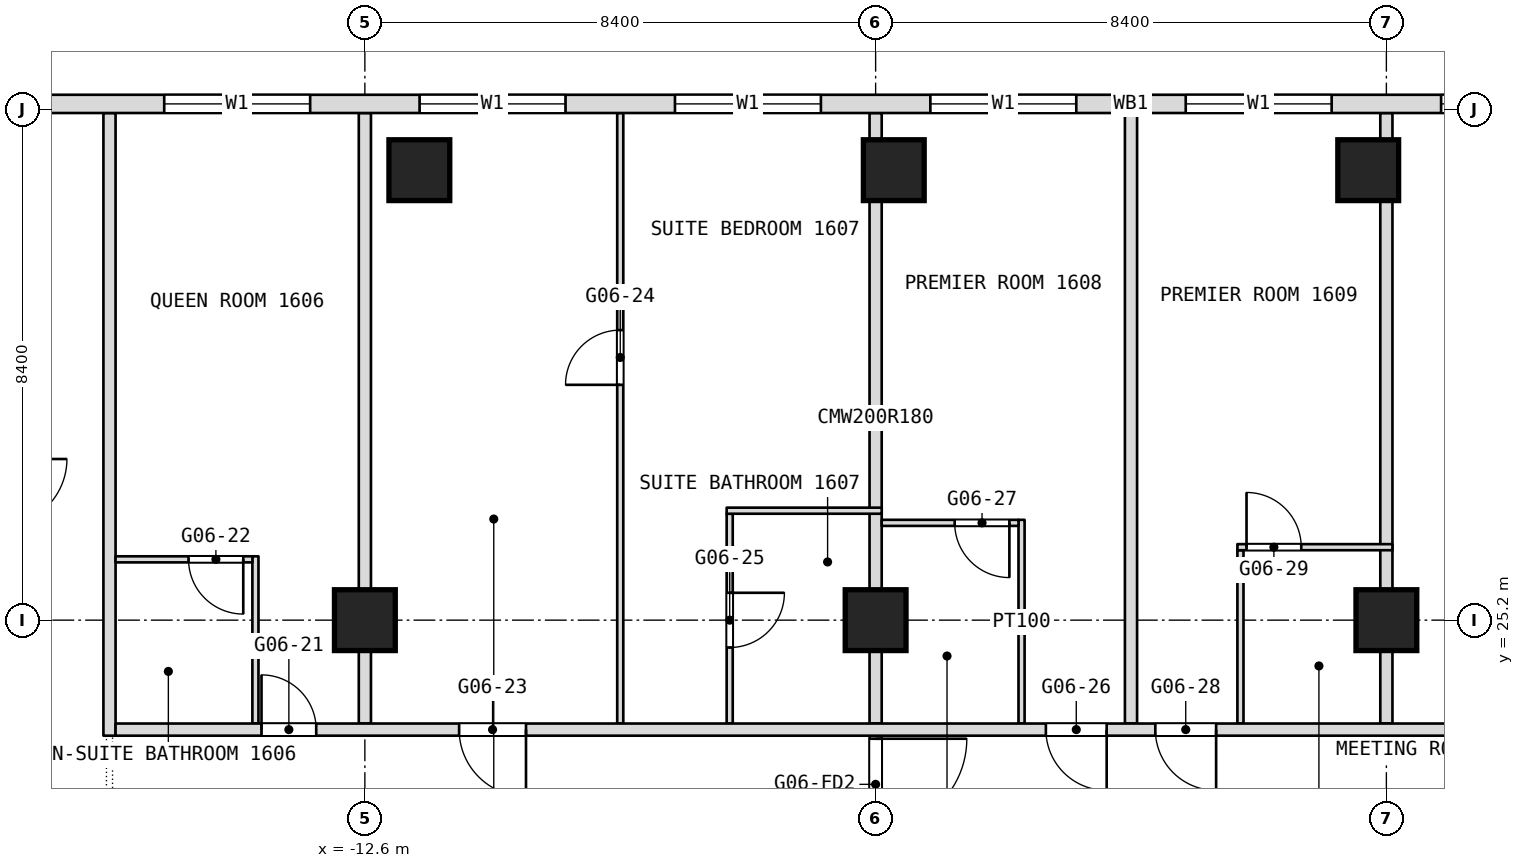
"""IFC4 building model, lengths in metres.
Left out: names, types, materials, properties, quantities, classifications, styles, units other than length and angle.
Written with IfcOpenShell. Run it as: python <this file> out.ifc"""

import sys

from ifc_helpers import new_model, si_unit, direction, frame, frame_2d, origin, origin_2d, place, context, subcontext, project, spatial, rectangle, extrude, element, fill, save


model = new_model("IFC4")
c1 = context("Model", 3, precision=1e-05, world=origin(), true_north=direction((0.0, 1.0)))
c2 = subcontext(c1, "Body", "Model", "MODEL_VIEW")
j1 = project(units=[si_unit("LENGTHUNIT", "METRE"), si_unit("PLANEANGLEUNIT", "RADIAN")], contexts=[c1])
p1 = place(None, origin())
s1 = spatial("IfcSite", under=j1, at=p1, CompositionType="ELEMENT")
p2 = place(p1, origin())
s2 = spatial("IfcBuilding", under=s1, at=p2, CompositionType="ELEMENT")
p3 = place(p2, frame((0.0, 0.0, 72.5)))
s3 = spatial("IfcBuildingStorey", under=s2, at=p3, CompositionType="ELEMENT", Elevation=72.5)
for number, where, z_axis, x_axis in (
    (1, (-12.6, 25.2, 0.0), (0.0, 0.0, 1.0), (1.0, 0.0, 0.0)),
    (2, (-4.2, 25.2, 0.0), (0.0, 0.0, 1.0), (1.0, 0.0, 0.0)),
    (3, (4.2, 25.2, 0.0), (0.0, 0.0, 1.0), (1.0, 0.0, 0.0)),
    (4, (-11.704, 32.6, 0.0), (0.0, 0.0, 1.0), (1.0, 0.0, 0.0)),
    (5, (-3.901, 32.6, 0.0), (0.0, 0.0, 1.0), (1.0, 0.0, 0.0)),
    (6, (3.901, 32.6, 0.0), (0.0, 0.0, 1.0), (1.0, 0.0, 0.0)),
):
    element("IfcColumn", number, at=place(p3, frame(where, z_axis=z_axis, x_axis=x_axis)), inside=s3, PredefinedType="COLUMN", context=c2, shape_type="SweptSolid", body=[
        extrude(rectangle(XDim=1.0, YDim=1.0, at=origin_2d()), origin(), (0.0, 0.0, 1.0), 3.6),
    ])
p4 = place(p3, frame((4.2, 23.5, 0.0), z_axis=(0.0, 0.0, 1.0), x_axis=(0.0, 1.0, 0.0)))
e7 = element("IfcWall", 7, at=p4, inside=s3, PredefinedType="PARTITIONING", context=c2, shape_type="SweptSolid", body=[
    extrude(rectangle(XDim=10.04, YDim=0.2, at=frame_2d((5.02, 0.0))), origin(), (0.0, 0.0, 1.0), 3.34),
])
p5 = place(p3, frame((1.8, 23.5, 0.0), z_axis=(0.0, 0.0, 1.0), x_axis=(0.0, 1.0, 0.0)))
e8 = element("IfcWall", 8, at=p5, inside=s3, PredefinedType="PARTITIONING", context=c2, shape_type="SweptSolid", body=[
    extrude(rectangle(XDim=2.85, YDim=0.1, at=frame_2d((1.425, 0.0))), origin(), (0.0, 0.0, 1.0), 3.34),
])
p6 = place(p3, frame((0.0, 23.5, 0.0), z_axis=(0.0, 0.0, 1.0), x_axis=(0.0, 1.0, 0.0)))
e9 = element("IfcWall", 9, at=p6, inside=s3, PredefinedType="PARTITIONING", context=c2, shape_type="SweptSolid", body=[
    extrude(rectangle(XDim=10.04, YDim=0.2, at=frame_2d((5.02, 0.0))), origin(), (0.0, 0.0, 1.0), 3.34),
])
p7 = place(p3, frame((-1.8, 23.5, 0.0), z_axis=(0.0, 0.0, 1.0), x_axis=(0.0, 1.0, 0.0)))
e10 = element("IfcWall", 10, at=p7, inside=s3, PredefinedType="PARTITIONING", context=c2, shape_type="SweptSolid", body=[
    extrude(rectangle(XDim=3.35, YDim=0.1, at=frame_2d((1.675, 0.0))), origin(), (0.0, 0.0, 1.0), 3.34),
])
p8 = place(p3, frame((-4.2, 16.8, 0.0), z_axis=(0.0, 0.0, 1.0), x_axis=(0.0, 1.0, 0.0)))
e11 = element("IfcWall", 11, at=p8, inside=s3, PredefinedType="PARTITIONING", context=c2, shape_type="SweptSolid", body=[
    extrude(rectangle(XDim=6.7, YDim=0.2, at=frame_2d((3.35, 0.0))), origin(), (0.0, 0.0, 1.0), 3.34),
])
p9 = place(p8, frame((0.15, 0.0, 0.0)))
e12 = element("IfcOpeningElement", 12, at=p9, cuts=e11, PredefinedType="OPENING", context=c2, shape_type="SweptSolid", body=[
    extrude(rectangle(XDim=1.5, YDim=2.1, at=frame_2d((0.75, 1.05))), frame((0.0, 0.1, 0.0), z_axis=(0.0, -1.0, 0.0), x_axis=(1.0, 0.0, 0.0)), (0.0, 0.0, 1.0), 0.2),
])
p10 = place(p8, frame((4.95, 0.0, 0.0)))
e13 = element("IfcOpeningElement", 13, at=p10, cuts=e11, PredefinedType="OPENING", context=c2, shape_type="SweptSolid", body=[
    extrude(rectangle(XDim=1.5, YDim=2.1, at=frame_2d((0.75, 1.05))), frame((0.0, 0.1, 0.0), z_axis=(0.0, -1.0, 0.0), x_axis=(1.0, 0.0, 0.0)), (0.0, 0.0, 1.0), 0.2),
])
p11 = place(p3, frame((-4.2, 23.5, 0.0), z_axis=(0.0, 0.0, 1.0), x_axis=(0.0, 1.0, 0.0)))
e14 = element("IfcWall", 14, at=p11, inside=s3, PredefinedType="PARTITIONING", context=c2, shape_type="SweptSolid", body=[
    extrude(rectangle(XDim=10.04, YDim=0.2, at=frame_2d((5.02, 0.0))), origin(), (0.0, 0.0, 1.0), 3.34),
])
p12 = place(p3, frame((-6.6, 23.5, 0.0), z_axis=(0.0, 0.0, 1.0), x_axis=(0.0, 1.0, 0.0)))
e15 = element("IfcWall", 15, at=p12, inside=s3, PredefinedType="PARTITIONING", context=c2, shape_type="SweptSolid", body=[
    extrude(rectangle(XDim=3.45, YDim=0.1, at=frame_2d((1.725, 0.0))), origin(), (0.0, 0.0, 1.0), 3.34),
])
p13 = place(p12, frame((1.25, 0.0, 0.0)))
e16 = element("IfcOpeningElement", 16, at=p13, cuts=e15, PredefinedType="OPENING", context=c2, shape_type="SweptSolid", body=[
    extrude(rectangle(XDim=0.9, YDim=2.1, at=frame_2d((0.45, 1.05))), frame((0.0, 0.05, 0.0), z_axis=(0.0, -1.0, 0.0), x_axis=(1.0, 0.0, 0.0)), (0.0, 0.0, 1.0), 0.1),
])
p14 = place(p3, frame((-8.4, 23.5, 0.0), z_axis=(0.0, 0.0, 1.0), x_axis=(0.0, 1.0, 0.0)))
e17 = element("IfcWall", 17, at=p14, inside=s3, PredefinedType="PARTITIONING", context=c2, shape_type="SweptSolid", body=[
    extrude(rectangle(XDim=10.04, YDim=0.1, at=frame_2d((5.02, 0.0))), origin(), (0.0, 0.0, 1.0), 3.34),
])
p15 = place(p14, frame((5.57, 0.0, 0.0)))
e18 = element("IfcOpeningElement", 18, at=p15, cuts=e17, PredefinedType="OPENING", context=c2, shape_type="SweptSolid", body=[
    extrude(rectangle(XDim=0.9, YDim=2.1, at=frame_2d((0.45, 1.05))), frame((0.0, 0.05, 0.0), z_axis=(0.0, -1.0, 0.0), x_axis=(1.0, 0.0, 0.0)), (0.0, 0.0, 1.0), 0.1),
])
p16 = place(p3, frame((-12.6, 23.5, 0.0), z_axis=(0.0, 0.0, 1.0), x_axis=(0.0, 1.0, 0.0)))
e19 = element("IfcWall", 19, at=p16, inside=s3, PredefinedType="PARTITIONING", context=c2, shape_type="SweptSolid", body=[
    extrude(rectangle(XDim=10.04, YDim=0.2, at=frame_2d((5.02, 0.0))), origin(), (0.0, 0.0, 1.0), 3.34),
])
p17 = place(p3, frame((-14.4, 23.5, 0.0), z_axis=(0.0, 0.0, 1.0), x_axis=(0.0, 1.0, 0.0)))
e20 = element("IfcWall", 20, at=p17, inside=s3, PredefinedType="PARTITIONING", context=c2, shape_type="SweptSolid", body=[
    extrude(rectangle(XDim=2.75, YDim=0.1, at=frame_2d((1.375, 0.0))), origin(), (0.0, 0.0, 1.0), 3.34),
])
p18 = place(p3, frame((-16.8, 23.3, 0.0), z_axis=(0.0, 0.0, 1.0), x_axis=(0.0, 1.0, 0.0)))
e21 = element("IfcWall", 21, at=p18, inside=s3, PredefinedType="PARTITIONING", context=c2, shape_type="SweptSolid", body=[
    extrude(rectangle(XDim=10.24, YDim=0.2, at=frame_2d((5.12, 0.0))), origin(), (0.0, 0.0, 1.0), 3.34),
])
p19 = place(p3, frame((-16.7, 23.4, 0.0), z_axis=(0.0, 0.0, 1.0), x_axis=(1.0, 0.0, 0.0)))
e22 = element("IfcWall", 22, at=p19, inside=s3, PredefinedType="PARTITIONING", context=c2, shape_type="SweptSolid", body=[
    extrude(rectangle(XDim=23.4, YDim=0.2, at=frame_2d((11.7, 0.0))), origin(), (0.0, 0.0, 1.0), 3.34),
])
p20 = place(p19, frame((2.4, 0.0, 0.0)))
e23 = element("IfcOpeningElement", 23, at=p20, cuts=e22, PredefinedType="OPENING", context=c2, shape_type="SweptSolid", body=[
    extrude(rectangle(XDim=0.9, YDim=2.1, at=frame_2d((0.45, 1.05))), frame((0.0, 0.1, 0.0), z_axis=(0.0, -1.0, 0.0), x_axis=(1.0, 0.0, 0.0)), (0.0, 0.0, 1.0), 0.2),
])
p21 = place(p19, frame((5.65, 0.0, 0.0)))
e24 = element("IfcOpeningElement", 24, at=p21, cuts=e22, PredefinedType="OPENING", context=c2, shape_type="SweptSolid", body=[
    extrude(rectangle(XDim=1.1, YDim=2.1, at=frame_2d((0.55, 1.05))), frame((0.0, 0.1, 0.0), z_axis=(0.0, -1.0, 0.0), x_axis=(1.0, 0.0, 0.0)), (0.0, 0.0, 1.0), 0.2),
])
p22 = place(p19, frame((15.3, 0.0, 0.0)))
e25 = element("IfcOpeningElement", 25, at=p22, cuts=e22, PredefinedType="OPENING", context=c2, shape_type="SweptSolid", body=[
    extrude(rectangle(XDim=1.0, YDim=2.1, at=frame_2d((0.5, 1.05))), frame((0.0, 0.1, 0.0), z_axis=(0.0, -1.0, 0.0), x_axis=(1.0, 0.0, 0.0)), (0.0, 0.0, 1.0), 0.2),
])
p23 = place(p19, frame((17.1, 0.0, 0.0)))
e26 = element("IfcOpeningElement", 26, at=p23, cuts=e22, PredefinedType="OPENING", context=c2, shape_type="SweptSolid", body=[
    extrude(rectangle(XDim=1.0, YDim=2.1, at=frame_2d((0.5, 1.05))), frame((0.0, 0.1, 0.0), z_axis=(0.0, -1.0, 0.0), x_axis=(1.0, 0.0, 0.0)), (0.0, 0.0, 1.0), 0.2),
])
p24 = place(p3, frame((-16.7, 26.2, 0.0), z_axis=(0.0, 0.0, 1.0), x_axis=(1.0, 0.0, 0.0)))
e27 = element("IfcWall", 27, at=p24, inside=s3, PredefinedType="PARTITIONING", context=c2, shape_type="SweptSolid", body=[
    extrude(rectangle(XDim=2.25, YDim=0.1, at=frame_2d((1.125, 0.0))), origin(), (0.0, 0.0, 1.0), 3.34),
])
p25 = place(p24, frame((1.2, 0.0, 0.0)))
e28 = element("IfcOpeningElement", 28, at=p25, cuts=e27, PredefinedType="OPENING", context=c2, shape_type="SweptSolid", body=[
    extrude(rectangle(XDim=0.9, YDim=2.1, at=frame_2d((0.45, 1.05))), frame((0.0, 0.05, 0.0), z_axis=(0.0, -1.0, 0.0), x_axis=(1.0, 0.0, 0.0)), (0.0, 0.0, 1.0), 0.1),
])
p26 = place(p3, frame((1.75, 26.4, 0.0), z_axis=(0.0, 0.0, 1.0), x_axis=(1.0, 0.0, 0.0)))
e29 = element("IfcWall", 29, at=p26, inside=s3, PredefinedType="PARTITIONING", context=c2, shape_type="SweptSolid", body=[
    extrude(rectangle(XDim=2.55, YDim=0.1, at=frame_2d((1.275, 0.0))), origin(), (0.0, 0.0, 1.0), 3.34),
])
p27 = place(p26, frame((0.15, 0.0, 0.0)))
e30 = element("IfcOpeningElement", 30, at=p27, cuts=e29, PredefinedType="OPENING", context=c2, shape_type="SweptSolid", body=[
    extrude(rectangle(XDim=0.9, YDim=2.1, at=frame_2d((0.45, 1.05))), frame((0.0, 0.05, 0.0), z_axis=(0.0, -1.0, 0.0), x_axis=(1.0, 0.0, 0.0)), (0.0, 0.0, 1.0), 0.1),
])
p28 = place(p3, frame((-4.1, 26.8, 0.0), z_axis=(0.0, 0.0, 1.0), x_axis=(1.0, 0.0, 0.0)))
e31 = element("IfcWall", 31, at=p28, inside=s3, PredefinedType="PARTITIONING", context=c2, shape_type="SweptSolid", body=[
    extrude(rectangle(XDim=2.25, YDim=0.1, at=frame_2d((1.125, 0.0))), origin(), (0.0, 0.0, 1.0), 3.34),
])
p29 = place(p28, frame((1.2, 0.0, 0.0)))
e32 = element("IfcOpeningElement", 32, at=p29, cuts=e31, PredefinedType="OPENING", context=c2, shape_type="SweptSolid", body=[
    extrude(rectangle(XDim=0.9, YDim=2.1, at=frame_2d((0.45, 1.05))), frame((0.0, 0.05, 0.0), z_axis=(0.0, -1.0, 0.0), x_axis=(1.0, 0.0, 0.0)), (0.0, 0.0, 1.0), 0.1),
])
p30 = place(p3, frame((-6.65, 27.0, 0.0), z_axis=(0.0, 0.0, 1.0), x_axis=(1.0, 0.0, 0.0)))
e33 = element("IfcWall", 33, at=p30, inside=s3, PredefinedType="PARTITIONING", context=c2, shape_type="SweptSolid", body=[
    extrude(rectangle(XDim=2.55, YDim=0.1, at=frame_2d((1.275, 0.0))), origin(), (0.0, 0.0, 1.0), 3.34),
])
p31 = place(p3, frame((23.406, 33.69, 0.0), z_axis=(0.0, 0.0, 1.0), x_axis=(-1.0, 0.0, 0.0)))
e34 = element("IfcWall", 34, at=p31, inside=s3, PredefinedType="NOTDEFINED", context=c2, shape_type="SweptSolid", body=[
    extrude(rectangle(XDim=46.812, YDim=0.3, at=frame_2d((23.406, 0.0))), origin(), (0.0, 0.0, 1.0), 3.6),
])
p32 = place(p31, frame((2.186, 0.0, 0.9)))
e35 = element("IfcOpeningElement", 35, at=p32, cuts=e34, PredefinedType="OPENING", context=c2, shape_type="SweptSolid", body=[
    extrude(rectangle(XDim=2.4, YDim=2.1, at=frame_2d((1.2, 1.05))), frame((0.0, 0.15, 0.0), z_axis=(0.0, -1.0, 0.0), x_axis=(1.0, 0.0, 0.0)), (0.0, 0.0, 1.0), 0.3),
])
p33 = place(p31, frame((7.506, 0.0, 0.9)))
e36 = element("IfcOpeningElement", 36, at=p33, cuts=e34, PredefinedType="OPENING", context=c2, shape_type="SweptSolid", body=[
    extrude(rectangle(XDim=2.4, YDim=2.1, at=frame_2d((1.2, 1.05))), frame((0.0, 0.15, 0.0), z_axis=(0.0, -1.0, 0.0), x_axis=(1.0, 0.0, 0.0)), (0.0, 0.0, 1.0), 0.3),
])
p34 = place(p31, frame((11.706, 0.0, 0.9)))
e37 = element("IfcOpeningElement", 37, at=p34, cuts=e34, PredefinedType="OPENING", context=c2, shape_type="SweptSolid", body=[
    extrude(rectangle(XDim=2.4, YDim=2.1, at=frame_2d((1.2, 1.05))), frame((0.0, 0.15, 0.0), z_axis=(0.0, -1.0, 0.0), x_axis=(1.0, 0.0, 0.0)), (0.0, 0.0, 1.0), 0.3),
])
p35 = place(p31, frame((15.906, 0.0, 0.9)))
e38 = element("IfcOpeningElement", 38, at=p35, cuts=e34, PredefinedType="OPENING", context=c2, shape_type="SweptSolid", body=[
    extrude(rectangle(XDim=2.4, YDim=2.1, at=frame_2d((1.2, 1.05))), frame((0.0, 0.15, 0.0), z_axis=(0.0, -1.0, 0.0), x_axis=(1.0, 0.0, 0.0)), (0.0, 0.0, 1.0), 0.3),
])
p36 = place(p31, frame((20.106, 0.0, 0.9)))
e39 = element("IfcOpeningElement", 39, at=p36, cuts=e34, PredefinedType="OPENING", context=c2, shape_type="SweptSolid", body=[
    extrude(rectangle(XDim=2.4, YDim=2.1, at=frame_2d((1.2, 1.05))), frame((0.0, 0.15, 0.0), z_axis=(0.0, -1.0, 0.0), x_axis=(1.0, 0.0, 0.0)), (0.0, 0.0, 1.0), 0.3),
])
p37 = place(p31, frame((24.306, 0.0, 0.9)))
e40 = element("IfcOpeningElement", 40, at=p37, cuts=e34, PredefinedType="OPENING", context=c2, shape_type="SweptSolid", body=[
    extrude(rectangle(XDim=2.4, YDim=2.1, at=frame_2d((1.2, 1.05))), frame((0.0, 0.15, 0.0), z_axis=(0.0, -1.0, 0.0), x_axis=(1.0, 0.0, 0.0)), (0.0, 0.0, 1.0), 0.3),
])
p38 = place(p31, frame((28.506, 0.0, 0.9)))
e41 = element("IfcOpeningElement", 41, at=p38, cuts=e34, PredefinedType="OPENING", context=c2, shape_type="SweptSolid", body=[
    extrude(rectangle(XDim=2.4, YDim=2.1, at=frame_2d((1.2, 1.05))), frame((0.0, 0.15, 0.0), z_axis=(0.0, -1.0, 0.0), x_axis=(1.0, 0.0, 0.0)), (0.0, 0.0, 1.0), 0.3),
])
p39 = place(p31, frame((32.706, 0.0, 0.9)))
e42 = element("IfcOpeningElement", 42, at=p39, cuts=e34, PredefinedType="OPENING", context=c2, shape_type="SweptSolid", body=[
    extrude(rectangle(XDim=2.4, YDim=2.1, at=frame_2d((1.2, 1.05))), frame((0.0, 0.15, 0.0), z_axis=(0.0, -1.0, 0.0), x_axis=(1.0, 0.0, 0.0)), (0.0, 0.0, 1.0), 0.3),
])
p40 = place(p31, frame((36.906, 0.0, 0.9)))
e43 = element("IfcOpeningElement", 43, at=p40, cuts=e34, PredefinedType="OPENING", context=c2, shape_type="SweptSolid", body=[
    extrude(rectangle(XDim=2.4, YDim=2.1, at=frame_2d((1.2, 1.05))), frame((0.0, 0.15, 0.0), z_axis=(0.0, -1.0, 0.0), x_axis=(1.0, 0.0, 0.0)), (0.0, 0.0, 1.0), 0.3),
])
p41 = place(p31, frame((42.226, 0.0, 0.9)))
e44 = element("IfcOpeningElement", 44, at=p41, cuts=e34, PredefinedType="OPENING", context=c2, shape_type="SweptSolid", body=[
    extrude(rectangle(XDim=2.4, YDim=2.1, at=frame_2d((1.2, 1.05))), frame((0.0, 0.15, 0.0), z_axis=(0.0, -1.0, 0.0), x_axis=(1.0, 0.0, 0.0)), (0.0, 0.0, 1.0), 0.3),
])
p42 = place(p13, origin())
e45 = element("IfcDoor", 45, at=p42, inside=s3, OperationType="SINGLE_SWING_RIGHT", PredefinedType="DOOR", context=c2, shape_type="SweptSolid", body=[
    extrude(rectangle(XDim=0.9, YDim=2.1, at=frame_2d((0.45, 1.05))), frame((0.0, 0.025, 0.0), z_axis=(0.0, -1.0, 0.0), x_axis=(1.0, 0.0, 0.0)), (0.0, 0.0, 1.0), 0.05),
])
fill(e16, e45)
p43 = place(p15, origin())
e46 = element("IfcDoor", 46, at=p43, inside=s3, OperationType="SINGLE_SWING_RIGHT", PredefinedType="DOOR", context=c2, shape_type="SweptSolid", body=[
    extrude(rectangle(XDim=0.9, YDim=2.1, at=frame_2d((0.45, 1.05))), frame((0.0, 0.025, 0.0), z_axis=(0.0, -1.0, 0.0), x_axis=(1.0, 0.0, 0.0)), (0.0, 0.0, 1.0), 0.05),
])
fill(e18, e46)
p44 = place(p20, origin())
e47 = element("IfcDoor", 47, at=p44, inside=s3, OperationType="SINGLE_SWING_LEFT", PredefinedType="DOOR", context=c2, shape_type="SweptSolid", body=[
    extrude(rectangle(XDim=0.9, YDim=2.1, at=frame_2d((0.45, 1.05))), frame((0.0, 0.025, 0.0), z_axis=(0.0, -1.0, 0.0), x_axis=(1.0, 0.0, 0.0)), (0.0, 0.0, 1.0), 0.05),
])
fill(e23, e47)
p45 = place(p21, origin())
e48 = element("IfcDoor", 48, at=p45, inside=s3, OperationType="SINGLE_SWING_RIGHT", PredefinedType="DOOR", context=c2, shape_type="SweptSolid", body=[
    extrude(rectangle(XDim=1.1, YDim=2.1, at=frame_2d((0.55, 1.05))), frame((0.0, 0.025, 0.0), z_axis=(0.0, -1.0, 0.0), x_axis=(1.0, 0.0, 0.0)), (0.0, 0.0, 1.0), 0.05),
])
fill(e24, e48)
p46 = place(p22, origin())
e49 = element("IfcDoor", 49, at=p46, inside=s3, OperationType="SINGLE_SWING_LEFT", PredefinedType="DOOR", context=c2, shape_type="SweptSolid", body=[
    extrude(rectangle(XDim=1.0, YDim=2.1, at=frame_2d((0.5, 1.05))), frame((0.0, 0.025, 0.0), z_axis=(0.0, -1.0, 0.0), x_axis=(1.0, 0.0, 0.0)), (0.0, 0.0, 1.0), 0.05),
])
fill(e25, e49)
p47 = place(p23, origin())
e50 = element("IfcDoor", 50, at=p47, inside=s3, OperationType="SINGLE_SWING_LEFT", PredefinedType="DOOR", context=c2, shape_type="SweptSolid", body=[
    extrude(rectangle(XDim=1.0, YDim=2.1, at=frame_2d((0.5, 1.05))), frame((0.0, 0.025, 0.0), z_axis=(0.0, -1.0, 0.0), x_axis=(1.0, 0.0, 0.0)), (0.0, 0.0, 1.0), 0.05),
])
fill(e26, e50)
p48 = place(p25, origin())
e51 = element("IfcDoor", 51, at=p48, inside=s3, OperationType="SINGLE_SWING_LEFT", PredefinedType="DOOR", context=c2, shape_type="SweptSolid", body=[
    extrude(rectangle(XDim=0.9, YDim=2.1, at=frame_2d((0.45, 1.05))), frame((0.0, 0.025, 0.0), z_axis=(0.0, -1.0, 0.0), x_axis=(1.0, 0.0, 0.0)), (0.0, 0.0, 1.0), 0.05),
])
fill(e28, e51)
p49 = place(p27, origin())
e52 = element("IfcDoor", 52, at=p49, inside=s3, OperationType="SINGLE_SWING_RIGHT", PredefinedType="DOOR", context=c2, shape_type="SweptSolid", body=[
    extrude(rectangle(XDim=0.9, YDim=2.1, at=frame_2d((0.45, 1.05))), frame((0.0, 0.025, 0.0), z_axis=(0.0, -1.0, 0.0), x_axis=(1.0, 0.0, 0.0)), (0.0, 0.0, 1.0), 0.05),
])
fill(e30, e52)
p50 = place(p29, origin())
e53 = element("IfcDoor", 53, at=p50, inside=s3, OperationType="SINGLE_SWING_LEFT", PredefinedType="DOOR", context=c2, shape_type="SweptSolid", body=[
    extrude(rectangle(XDim=0.9, YDim=2.1, at=frame_2d((0.45, 1.05))), frame((0.0, 0.025, 0.0), z_axis=(0.0, -1.0, 0.0), x_axis=(1.0, 0.0, 0.0)), (0.0, 0.0, 1.0), 0.05),
])
fill(e32, e53)
p51 = place(p35, origin())
e54 = element("IfcWindow", 54, at=p51, inside=s3, PartitioningType="SINGLE_PANEL", PredefinedType="WINDOW", context=c2, shape_type="SweptSolid", body=[
    extrude(rectangle(XDim=2.4, YDim=2.1, at=frame_2d((1.2, 1.05))), frame((0.0, 0.03, 0.0), z_axis=(0.0, -1.0, 0.0), x_axis=(1.0, 0.0, 0.0)), (0.0, 0.0, 1.0), 0.06),
])
fill(e38, e54)
p52 = place(p36, origin())
e55 = element("IfcWindow", 55, at=p52, inside=s3, PartitioningType="SINGLE_PANEL", PredefinedType="WINDOW", context=c2, shape_type="SweptSolid", body=[
    extrude(rectangle(XDim=2.4, YDim=2.1, at=frame_2d((1.2, 1.05))), frame((0.0, 0.03, 0.0), z_axis=(0.0, -1.0, 0.0), x_axis=(1.0, 0.0, 0.0)), (0.0, 0.0, 1.0), 0.06),
])
fill(e39, e55)
p53 = place(p37, origin())
e56 = element("IfcWindow", 56, at=p53, inside=s3, PartitioningType="SINGLE_PANEL", PredefinedType="WINDOW", context=c2, shape_type="SweptSolid", body=[
    extrude(rectangle(XDim=2.4, YDim=2.1, at=frame_2d((1.2, 1.05))), frame((0.0, 0.03, 0.0), z_axis=(0.0, -1.0, 0.0), x_axis=(1.0, 0.0, 0.0)), (0.0, 0.0, 1.0), 0.06),
])
fill(e40, e56)
p54 = place(p38, origin())
e57 = element("IfcWindow", 57, at=p54, inside=s3, PartitioningType="SINGLE_PANEL", PredefinedType="WINDOW", context=c2, shape_type="SweptSolid", body=[
    extrude(rectangle(XDim=2.4, YDim=2.1, at=frame_2d((1.2, 1.05))), frame((0.0, 0.03, 0.0), z_axis=(0.0, -1.0, 0.0), x_axis=(1.0, 0.0, 0.0)), (0.0, 0.0, 1.0), 0.06),
])
fill(e41, e57)
p55 = place(p39, origin())
e58 = element("IfcWindow", 58, at=p55, inside=s3, PartitioningType="SINGLE_PANEL", PredefinedType="WINDOW", context=c2, shape_type="SweptSolid", body=[
    extrude(rectangle(XDim=2.4, YDim=2.1, at=frame_2d((1.2, 1.05))), frame((0.0, 0.03, 0.0), z_axis=(0.0, -1.0, 0.0), x_axis=(1.0, 0.0, 0.0)), (0.0, 0.0, 1.0), 0.06),
])
fill(e42, e58)
p56 = place(p40, origin())
e59 = element("IfcWindow", 59, at=p56, inside=s3, PartitioningType="SINGLE_PANEL", PredefinedType="WINDOW", context=c2, shape_type="SweptSolid", body=[
    extrude(rectangle(XDim=2.4, YDim=2.1, at=frame_2d((1.2, 1.05))), frame((0.0, 0.03, 0.0), z_axis=(0.0, -1.0, 0.0), x_axis=(1.0, 0.0, 0.0)), (0.0, 0.0, 1.0), 0.06),
])
fill(e43, e59)
p57 = place(p10, origin())
e60 = element("IfcDoor", 60, at=p57, inside=s3, OperationType="DOUBLE_DOOR_DOUBLE_SWING", PredefinedType="DOOR", context=c2, shape_type="SweptSolid", body=[
    extrude(rectangle(XDim=1.5, YDim=2.1, at=frame_2d((0.75, 1.05))), frame((0.0, 0.025, 0.0), z_axis=(0.0, -1.0, 0.0), x_axis=(1.0, 0.0, 0.0)), (0.0, 0.0, 1.0), 0.05),
])
fill(e13, e60)
save(model, sys.argv[1])
